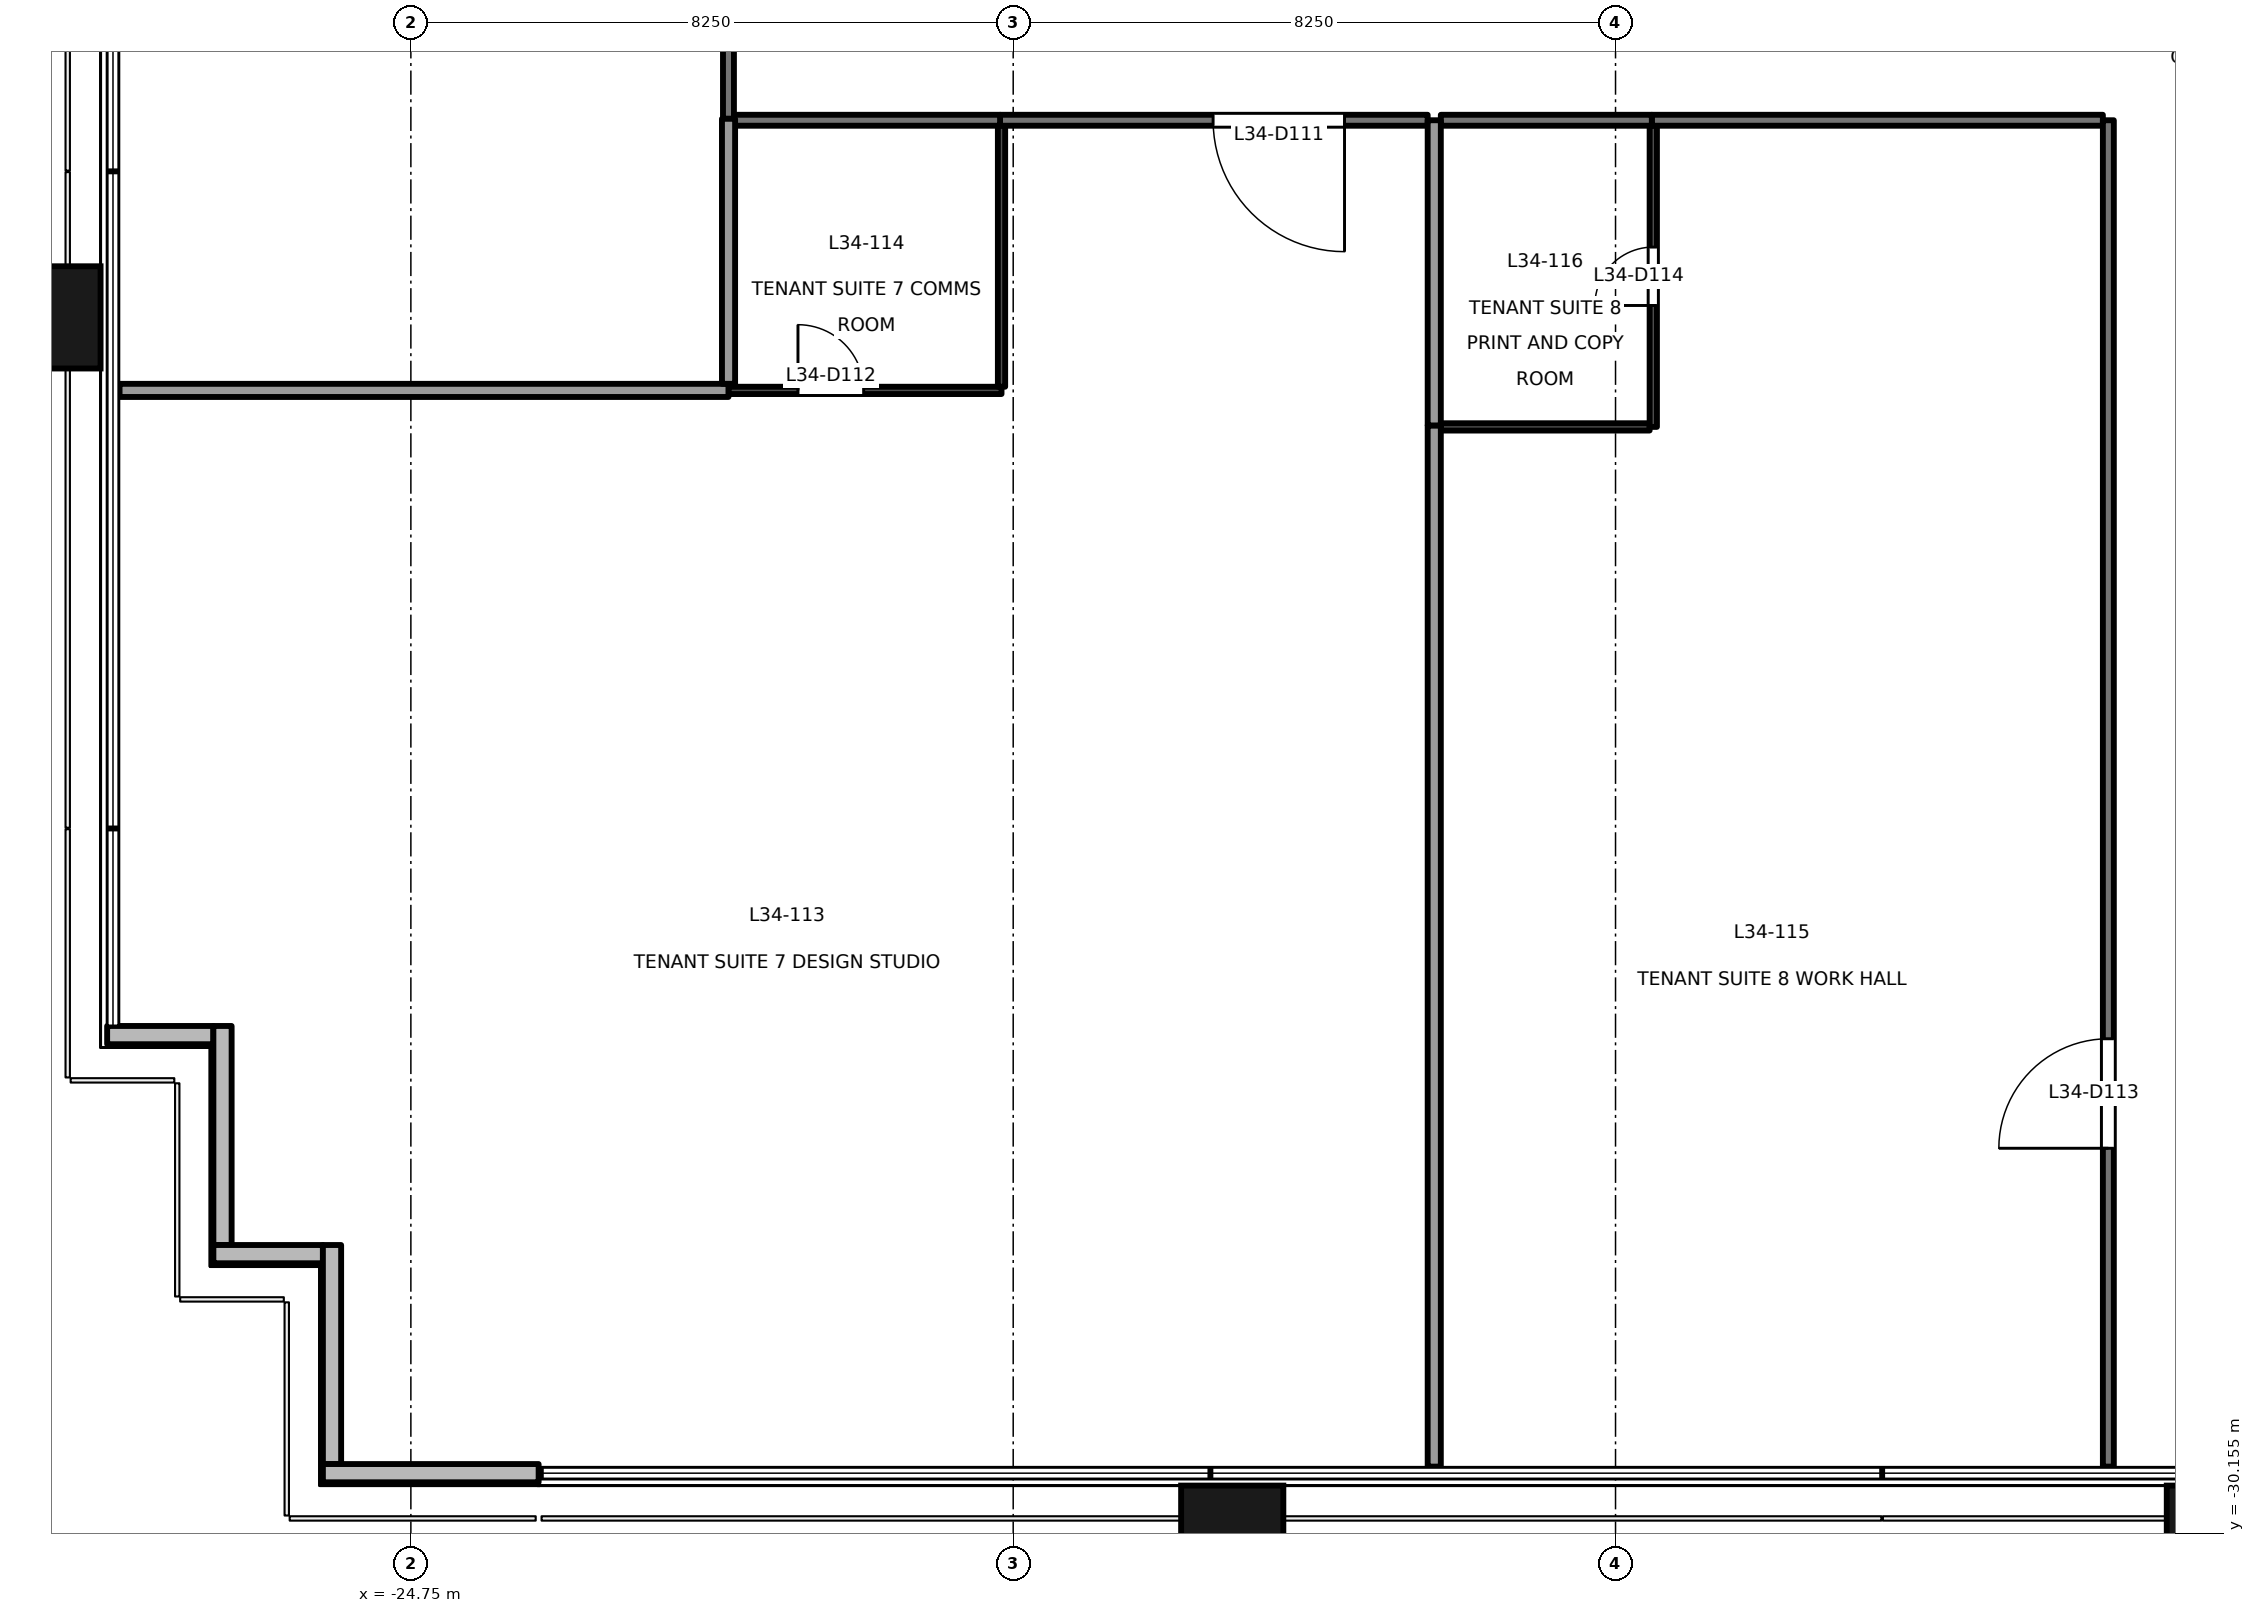
"""IFC4 building model, lengths in metres.
Left out: names, types, materials, properties, quantities, classifications, styles, units other than length and angle.
Written with IfcOpenShell. Run it as: python <this file> out.ifc"""

import sys

from ifc_helpers import new_model, si_unit, direction, frame, frame_2d, origin, origin_2d, place, context, subcontext, project, spatial, rectangle, extrude, element, fill, save


model = new_model("IFC4")
c1 = context("Model", 3, precision=1e-05, world=origin(), true_north=direction((0.0, 1.0)))
c2 = subcontext(c1, "Body", "Model", "MODEL_VIEW")
j1 = project(units=[si_unit("LENGTHUNIT", "METRE"), si_unit("PLANEANGLEUNIT", "RADIAN")], contexts=[c1])
p1 = place(None, origin())
s1 = spatial("IfcSite", under=j1, at=p1, CompositionType="ELEMENT")
p2 = place(p1, origin())
s2 = spatial("IfcBuilding", under=s1, at=p2, CompositionType="ELEMENT")
p3 = place(p2, frame((0.0, 0.0, 150.1)))
s3 = spatial("IfcBuildingStorey", under=s2, at=p3, CompositionType="ELEMENT", Elevation=150.1)
for number, where, z_axis, x_axis in (
    (1, (-13.5, -30.4, -0.2), (0.0, 0.0, 1.0), (1.0, 0.0, 0.0)),
    (2, (0.0, -30.4, -0.2), (0.0, 0.0, 1.0), (1.0, 0.0, 0.0)),
    (3, (-29.9, -13.5, -0.2), (0.0, 0.0, 1.0), (0.0, 1.0, 0.0)),
):
    element("IfcColumn", number, at=place(p3, frame(where, z_axis=z_axis, x_axis=x_axis)), inside=s3, PredefinedType="COLUMN", context=c2, shape_type="SweptSolid", body=[
        extrude(rectangle(XDim=1.4, YDim=1.8, at=origin_2d()), origin(), (0.0, 0.0, 1.0), 4.0),
    ])
p4 = place(p3, frame((-28.91, -23.33, 0.0), z_axis=(0.0, 0.0, 1.0), x_axis=(1.0, 0.0, 0.0)))
e4 = element("IfcWall", 4, at=p4, inside=s3, PredefinedType="SOLIDWALL", context=c2, shape_type="SweptSolid", body=[
    extrude(rectangle(XDim=1.455, YDim=0.25, at=frame_2d((0.728, 0.0))), origin(), (0.0, 0.0, 1.0), 3.8),
])
p5 = place(p3, frame((-27.33, -23.205, 0.0), z_axis=(0.0, 0.0, 1.0), x_axis=(0.0, -1.0, 0.0)))
e5 = element("IfcWall", 5, at=p5, inside=s3, PredefinedType="SOLIDWALL", context=c2, shape_type="SweptSolid", body=[
    extrude(rectangle(XDim=3.0, YDim=0.25, at=frame_2d((1.5, 0.0))), origin(), (0.0, 0.0, 1.0), 3.8),
])
p6 = place(p3, frame((-27.455, -26.33, 0.0), z_axis=(0.0, 0.0, 1.0), x_axis=(1.0, 0.0, 0.0)))
e6 = element("IfcWall", 6, at=p6, inside=s3, PredefinedType="SOLIDWALL", context=c2, shape_type="SweptSolid", body=[
    extrude(rectangle(XDim=1.5, YDim=0.25, at=frame_2d((0.75, 0.0))), origin(), (0.0, 0.0, 1.0), 3.8),
])
p7 = place(p3, frame((-25.83, -26.205, 0.0), z_axis=(0.0, 0.0, 1.0), x_axis=(0.0, -1.0, 0.0)))
e7 = element("IfcWall", 7, at=p7, inside=s3, PredefinedType="SOLIDWALL", context=c2, shape_type="SweptSolid", body=[
    extrude(rectangle(XDim=3.0, YDim=0.25, at=frame_2d((1.5, 0.0))), origin(), (0.0, 0.0, 1.0), 3.8),
])
p8 = place(p3, frame((-25.955, -29.33, 0.0), z_axis=(0.0, 0.0, 1.0), x_axis=(1.0, 0.0, 0.0)))
e8 = element("IfcWall", 8, at=p8, inside=s3, PredefinedType="SOLIDWALL", context=c2, shape_type="SweptSolid", body=[
    extrude(rectangle(XDim=2.955, YDim=0.25, at=frame_2d((1.478, 0.0))), origin(), (0.0, 0.0, 1.0), 3.8),
])
p9 = place(p3, frame((-20.4, -10.78, 0.0), z_axis=(0.0, 0.0, 1.0), x_axis=(0.0, 1.0, 0.0)))
e9 = element("IfcWall", 9, at=p9, inside=s3, PredefinedType="PARTITIONING", context=c2, shape_type="SweptSolid", body=[
    extrude(rectangle(XDim=8.19, YDim=0.15, at=frame_2d((4.095, 0.0))), origin(), (0.0, 0.0, 1.0), 3.3),
])
p10 = place(p9, frame((3.645, 0.0, 0.0)))
e10 = element("IfcOpeningElement", 10, at=p10, cuts=e9, PredefinedType="OPENING", context=c2, shape_type="SweptSolid", body=[
    extrude(rectangle(XDim=0.9, YDim=2.1, at=frame_2d((0.45, 1.05))), frame((0.0, 0.085, 0.0), z_axis=(0.0, -1.0, 0.0), x_axis=(1.0, 0.0, 0.0)), (0.0, 0.0, 1.0), 0.171),
])
p11 = place(p3, frame((-10.823, -10.8, 0.0), z_axis=(0.0, 0.0, 1.0), x_axis=(-1.0, 0.0, 0.0)))
e11 = element("IfcWall", 11, at=p11, inside=s3, PredefinedType="PARTITIONING", context=c2, shape_type="SweptSolid", body=[
    extrude(rectangle(XDim=5.857, YDim=0.15, at=frame_2d((2.928, 0.0))), origin(), (0.0, 0.0, 1.0), 2.9),
])
p12 = place(p11, frame((1.139, 0.0, 0.0)))
e12 = element("IfcOpeningElement", 12, at=p12, cuts=e11, PredefinedType="OPENING", context=c2, shape_type="SweptSolid", body=[
    extrude(rectangle(XDim=1.8, YDim=2.1, at=frame_2d((0.9, 1.05))), frame((0.0, 0.085, 0.0), z_axis=(0.0, -1.0, 0.0), x_axis=(1.0, 0.0, 0.0)), (0.0, 0.0, 1.0), 0.171),
])
p13 = place(p3, frame((-16.68, -10.8, 0.0), z_axis=(0.0, 0.0, 1.0), x_axis=(-1.0, 0.0, 0.0)))
e13 = element("IfcWall", 13, at=p13, inside=s3, PredefinedType="PARTITIONING", context=c2, shape_type="SweptSolid", body=[
    extrude(rectangle(XDim=3.645, YDim=0.15, at=frame_2d((1.823, 0.0))), origin(), (0.0, 0.0, 1.0), 3.8),
])
p14 = place(p3, frame((-1.575, -10.8, 0.0), z_axis=(0.0, 0.0, 1.0), x_axis=(-1.0, 0.0, 0.0)))
e14 = element("IfcWall", 14, at=p14, inside=s3, PredefinedType="PARTITIONING", context=c2, shape_type="SweptSolid", body=[
    extrude(rectangle(XDim=6.178, YDim=0.15, at=frame_2d((3.089, 0.0))), origin(), (0.0, 0.0, 1.0), 2.9),
])
p15 = place(p3, frame((-1.5, -29.24, 0.0), z_axis=(0.0, 0.0, 1.0), x_axis=(0.0, 1.0, 0.0)))
e15 = element("IfcWall", 15, at=p15, inside=s3, PredefinedType="PARTITIONING", context=c2, shape_type="SweptSolid", body=[
    extrude(rectangle(XDim=18.44, YDim=0.15, at=frame_2d((9.22, 0.0))), origin(), (0.0, 0.0, 1.0), 3.8),
])
p16 = place(p15, frame((4.36, 0.0, 0.0)))
e16 = element("IfcOpeningElement", 16, at=p16, cuts=e15, PredefinedType="OPENING", context=c2, shape_type="SweptSolid", body=[
    extrude(rectangle(XDim=1.5, YDim=2.1, at=frame_2d((0.75, 1.05))), frame((0.0, 0.085, 0.0), z_axis=(0.0, -1.0, 0.0), x_axis=(1.0, 0.0, 0.0)), (0.0, 0.0, 1.0), 0.171),
])
p17 = place(p3, frame((-7.753, -10.8, 0.0), z_axis=(0.0, 0.0, 1.0), x_axis=(-1.0, 0.0, 0.0)))
e17 = element("IfcWall", 17, at=p17, inside=s3, PredefinedType="PARTITIONING", context=c2, shape_type="SweptSolid", body=[
    extrude(rectangle(XDim=2.89, YDim=0.15, at=frame_2d((1.445, 0.0))), origin(), (0.0, 0.0, 1.0), 2.9),
])
p18 = place(p3, frame((-20.4, -14.5, 0.0), z_axis=(0.0, 0.0, 1.0), x_axis=(-1.0, 0.0, 0.0)))
e18 = element("IfcWall", 18, at=p18, inside=s3, PredefinedType="PARTITIONING", context=c2, shape_type="SweptSolid", body=[
    extrude(rectangle(XDim=8.34, YDim=0.18, at=frame_2d((4.17, 0.0))), origin(), (0.0, 0.0, 1.0), 3.8),
])
p19 = place(p3, frame((-20.399, -10.78, 0.0), z_axis=(0.0, 0.0, 1.0), x_axis=(0.0, -1.0, 0.0)))
e19 = element("IfcWall", 19, at=p19, inside=s3, PredefinedType="PARTITIONING", context=c2, shape_type="SweptSolid", body=[
    extrude(rectangle(XDim=3.63, YDim=0.18, at=frame_2d((1.815, 0.0))), origin(), (0.0, 0.0, 1.0), 3.8),
])
p20 = place(p3, frame((-20.4, -14.5, 0.0), z_axis=(0.0, 0.0, 1.0), x_axis=(1.0, 0.0, 0.0)))
e20 = element("IfcWall", 20, at=p20, inside=s3, PredefinedType="PARTITIONING", context=c2, shape_type="SweptSolid", body=[
    extrude(rectangle(XDim=3.74, YDim=0.1, at=frame_2d((1.87, 0.0))), origin(), (0.0, 0.0, 1.0), 3.8),
])
p21 = place(p20, frame((0.952, 0.0, 0.0)))
e21 = element("IfcOpeningElement", 21, at=p21, cuts=e20, PredefinedType="OPENING", context=c2, shape_type="SweptSolid", body=[
    extrude(rectangle(XDim=0.9, YDim=2.1, at=frame_2d((0.45, 1.05))), frame((0.0, 0.061, 0.0), z_axis=(0.0, -1.0, 0.0), x_axis=(1.0, 0.0, 0.0)), (0.0, 0.0, 1.0), 0.121),
])
p22 = place(p3, frame((-16.66, -14.45, 0.0), z_axis=(0.0, 0.0, 1.0), x_axis=(0.0, 1.0, 0.0)))
e22 = element("IfcWall", 22, at=p22, inside=s3, PredefinedType="PARTITIONING", context=c2, shape_type="SweptSolid", body=[
    extrude(rectangle(XDim=3.575, YDim=0.1, at=frame_2d((1.788, 0.0))), origin(), (0.0, 0.0, 1.0), 3.8),
])
p23 = place(p3, frame((-10.733, -14.98, 0.0), z_axis=(0.0, 0.0, 1.0), x_axis=(0.0, -1.0, 0.0)))
e23 = element("IfcWall", 23, at=p23, inside=s3, PredefinedType="PARTITIONING", context=c2, shape_type="SweptSolid", body=[
    extrude(rectangle(XDim=14.26, YDim=0.18, at=frame_2d((7.13, 0.0))), origin(), (0.0, 0.0, 1.0), 3.8),
])
p24 = place(p3, frame((-10.733, -10.8, 0.0), z_axis=(0.0, 0.0, 1.0), x_axis=(0.0, -1.0, 0.0)))
e24 = element("IfcWall", 24, at=p24, inside=s3, PredefinedType="PARTITIONING", context=c2, shape_type="SweptSolid", body=[
    extrude(rectangle(XDim=4.18, YDim=0.18, at=frame_2d((2.09, 0.0))), origin(), (0.0, 0.0, 1.0), 3.8),
])
p25 = place(p3, frame((-10.643, -15.0, 0.0), z_axis=(0.0, 0.0, 1.0), x_axis=(1.0, 0.0, 0.0)))
e25 = element("IfcWall", 25, at=p25, inside=s3, PredefinedType="PARTITIONING", context=c2, shape_type="SweptSolid", body=[
    extrude(rectangle(XDim=2.86, YDim=0.1, at=frame_2d((1.43, 0.0))), origin(), (0.0, 0.0, 1.0), 2.9),
])
p26 = place(p3, frame((-7.733, -15.0, 0.0), z_axis=(0.0, 0.0, 1.0), x_axis=(0.0, 1.0, 0.0)))
e26 = element("IfcWall", 26, at=p26, inside=s3, PredefinedType="PARTITIONING", context=c2, shape_type="SweptSolid", body=[
    extrude(rectangle(XDim=4.125, YDim=0.1, at=frame_2d((2.062, 0.0))), origin(), (0.0, 0.0, 1.0), 3.8),
])
p27 = place(p26, frame((1.663, 0.0, 0.0)))
e27 = element("IfcOpeningElement", 27, at=p27, cuts=e26, PredefinedType="OPENING", context=c2, shape_type="SweptSolid", body=[
    extrude(rectangle(XDim=0.8, YDim=2.1, at=frame_2d((0.4, 1.05))), frame((0.0, 0.061, 0.0), z_axis=(0.0, -1.0, 0.0), x_axis=(1.0, 0.0, 0.0)), (0.0, 0.0, 1.0), 0.121),
])
p28 = place(p12, origin())
e28 = element("IfcDoor", 28, at=p28, inside=s3, OperationType="DOUBLE_DOOR_SINGLE_SWING", PredefinedType="DOOR", context=c2, shape_type="SweptSolid", body=[
    extrude(rectangle(XDim=1.8, YDim=2.1, at=frame_2d((0.9, 1.05))), frame((0.0, 0.025, 0.0), z_axis=(0.0, -1.0, 0.0), x_axis=(1.0, 0.0, 0.0)), (0.0, 0.0, 1.0), 0.05),
])
fill(e12, e28)
p29 = place(p21, origin())
e29 = element("IfcDoor", 29, at=p29, inside=s3, OperationType="SINGLE_SWING_LEFT", PredefinedType="DOOR", context=c2, shape_type="SweptSolid", body=[
    extrude(rectangle(XDim=0.9, YDim=2.1, at=frame_2d((0.45, 1.05))), frame((0.0, 0.025, 0.0), z_axis=(0.0, -1.0, 0.0), x_axis=(1.0, 0.0, 0.0)), (0.0, 0.0, 1.0), 0.05),
])
fill(e21, e29)
p30 = place(p16, origin())
e30 = element("IfcDoor", 30, at=p30, inside=s3, OperationType="DOUBLE_DOOR_SINGLE_SWING", PredefinedType="DOOR", context=c2, shape_type="SweptSolid", body=[
    extrude(rectangle(XDim=1.5, YDim=2.1, at=frame_2d((0.75, 1.05))), frame((0.0, 0.025, 0.0), z_axis=(0.0, -1.0, 0.0), x_axis=(1.0, 0.0, 0.0)), (0.0, 0.0, 1.0), 0.05),
])
fill(e16, e30)
p31 = place(p27, origin())
e31 = element("IfcDoor", 31, at=p31, inside=s3, OperationType="SINGLE_SWING_LEFT", PredefinedType="DOOR", context=c2, shape_type="SweptSolid", body=[
    extrude(rectangle(XDim=0.8, YDim=2.1, at=frame_2d((0.4, 1.05))), frame((0.0, 0.025, 0.0), z_axis=(0.0, -1.0, 0.0), x_axis=(1.0, 0.0, 0.0)), (0.0, 0.0, 1.0), 0.05),
])
fill(e27, e31)
save(model, sys.argv[1])
